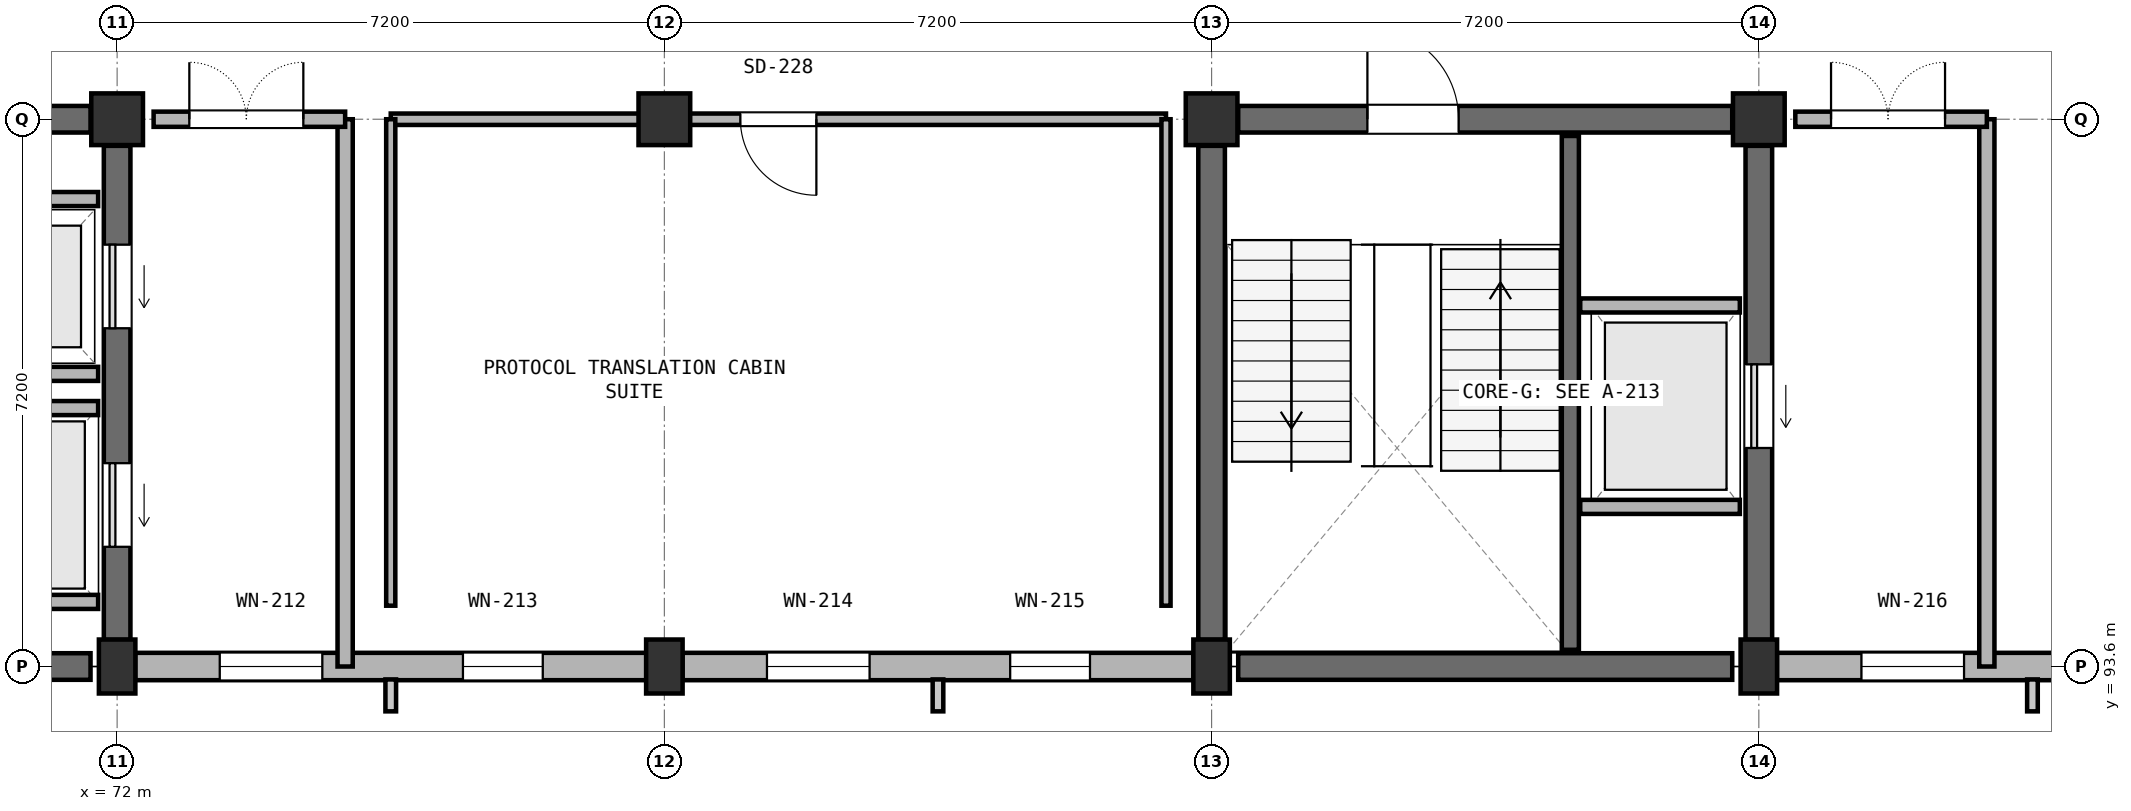
"""IFC4 building model, lengths in metres.
Left out: names, types, materials, properties, quantities, classifications, styles, units other than length and angle.
Written with IfcOpenShell. Run it as: python <this file> out.ifc"""

import sys

from ifc_helpers import new_model, si_unit, direction, frame, frame_2d, origin, origin_2d, place, context, subcontext, project, spatial, rectangle, extrude, element, fill, save


model = new_model("IFC4")
c1 = context("Model", 3, precision=1e-05, world=origin(), true_north=direction((0.0, 1.0)))
c2 = subcontext(c1, "Body", "Model", "MODEL_VIEW")
j1 = project(units=[si_unit("LENGTHUNIT", "METRE"), si_unit("PLANEANGLEUNIT", "RADIAN")], contexts=[c1])
p1 = place(None, origin())
s1 = spatial("IfcSite", under=j1, at=p1, CompositionType="ELEMENT")
p2 = place(p1, origin())
s2 = spatial("IfcBuilding", under=s1, at=p2, CompositionType="ELEMENT")
p3 = place(p2, frame((0.0, 0.0, 26.4)))
s3 = spatial("IfcBuildingStorey", under=s2, at=p3, CompositionType="ELEMENT", Elevation=26.4)
p4 = place(p3, frame((72.0, 93.6, 0.0), z_axis=(0.0, 0.0, 1.0), x_axis=(1.0, 0.0, 0.0)))
e1 = element("IfcColumn", 1, at=p4, inside=s3, PredefinedType="COLUMN", context=c2, shape_type="SweptSolid", body=[
    extrude(rectangle(XDim=0.48, YDim=0.71, at=origin_2d()), origin(), (0.0, 0.0, 1.0), 3.9),
])
p5 = place(p3, frame((72.0, 100.8, 0.0), z_axis=(0.0, 0.0, 1.0), x_axis=(1.0, 0.0, 0.0)))
e2 = element("IfcColumn", 2, at=p5, inside=s3, PredefinedType="COLUMN", context=c2, shape_type="SweptSolid", body=[
    extrude(rectangle(XDim=0.68, YDim=0.68, at=origin_2d()), origin(), (0.0, 0.0, 1.0), 3.9),
])
p6 = place(p3, frame((79.2, 93.6, 0.0), z_axis=(0.0, 0.0, 1.0), x_axis=(1.0, 0.0, 0.0)))
e3 = element("IfcColumn", 3, at=p6, inside=s3, PredefinedType="COLUMN", context=c2, shape_type="SweptSolid", body=[
    extrude(rectangle(XDim=0.48, YDim=0.71, at=origin_2d()), origin(), (0.0, 0.0, 1.0), 3.9),
])
p7 = place(p3, frame((79.2, 100.8, 0.0), z_axis=(0.0, 0.0, 1.0), x_axis=(1.0, 0.0, 0.0)))
e4 = element("IfcColumn", 4, at=p7, inside=s3, PredefinedType="COLUMN", context=c2, shape_type="SweptSolid", body=[
    extrude(rectangle(XDim=0.68, YDim=0.68, at=origin_2d()), origin(), (0.0, 0.0, 1.0), 3.9),
])
p8 = place(p3, frame((86.4, 93.6, 0.0), z_axis=(0.0, 0.0, 1.0), x_axis=(1.0, 0.0, 0.0)))
e5 = element("IfcColumn", 5, at=p8, inside=s3, PredefinedType="COLUMN", context=c2, shape_type="SweptSolid", body=[
    extrude(rectangle(XDim=0.48, YDim=0.71, at=origin_2d()), origin(), (0.0, 0.0, 1.0), 3.9),
])
p9 = place(p3, frame((86.4, 100.8, 0.0), z_axis=(0.0, 0.0, 1.0), x_axis=(1.0, 0.0, 0.0)))
e6 = element("IfcColumn", 6, at=p9, inside=s3, PredefinedType="COLUMN", context=c2, shape_type="SweptSolid", body=[
    extrude(rectangle(XDim=0.68, YDim=0.68, at=origin_2d()), origin(), (0.0, 0.0, 1.0), 3.9),
])
p10 = place(p3, frame((93.6, 93.6, 0.0), z_axis=(0.0, 0.0, 1.0), x_axis=(1.0, 0.0, 0.0)))
e7 = element("IfcColumn", 7, at=p10, inside=s3, PredefinedType="COLUMN", context=c2, shape_type="SweptSolid", body=[
    extrude(rectangle(XDim=0.48, YDim=0.71, at=origin_2d()), origin(), (0.0, 0.0, 1.0), 3.9),
])
p11 = place(p3, frame((93.6, 100.8, 0.0), z_axis=(0.0, 0.0, 1.0), x_axis=(1.0, 0.0, 0.0)))
e8 = element("IfcColumn", 8, at=p11, inside=s3, PredefinedType="COLUMN", context=c2, shape_type="SweptSolid", body=[
    extrude(rectangle(XDim=0.68, YDim=0.68, at=origin_2d()), origin(), (0.0, 0.0, 1.0), 3.9),
])
p12 = place(p3, frame((65.15, 93.6, 0.0), z_axis=(0.0, 0.0, 1.0), x_axis=(1.0, 0.0, 0.0)))
e9 = element("IfcWall", 9, at=p12, inside=s3, PredefinedType="SHEAR", context=c2, shape_type="SweptSolid", body=[
    extrude(rectangle(XDim=6.5, YDim=0.35, at=frame_2d((3.25, 0.0))), origin(), (0.0, 0.0, 1.0), 3.9),
])
p13 = place(p3, frame((72.0, 93.95, 0.0), z_axis=(0.0, 0.0, 1.0), x_axis=(0.0, 1.0, 0.0)))
e10 = element("IfcWall", 10, at=p13, inside=s3, PredefinedType="SHEAR", context=c2, shape_type="SweptSolid", body=[
    extrude(rectangle(XDim=6.5, YDim=0.35, at=frame_2d((3.25, 0.0))), origin(), (0.0, 0.0, 1.0), 3.9),
])
p14 = place(p13, frame((1.225, 0.0, 0.0)))
e11 = element("IfcOpeningElement", 11, at=p14, cuts=e10, PredefinedType="OPENING", context=c2, shape_type="SweptSolid", body=[
    extrude(rectangle(XDim=1.1, YDim=2.2, at=frame_2d((0.55, 1.1))), frame((0.0, 0.185, 0.0), z_axis=(0.0, -1.0, 0.0), x_axis=(1.0, 0.0, 0.0)), (0.0, 0.0, 1.0), 0.37),
])
p15 = place(p13, frame((4.1, 0.0, 0.0)))
e12 = element("IfcOpeningElement", 12, at=p15, cuts=e10, PredefinedType="OPENING", context=c2, shape_type="SweptSolid", body=[
    extrude(rectangle(XDim=1.1, YDim=2.2, at=frame_2d((0.55, 1.1))), frame((0.0, 0.185, 0.0), z_axis=(0.0, -1.0, 0.0), x_axis=(1.0, 0.0, 0.0)), (0.0, 0.0, 1.0), 0.37),
])
p16 = place(p3, frame((71.65, 100.8, 0.0), z_axis=(0.0, 0.0, 1.0), x_axis=(-1.0, 0.0, 0.0)))
e13 = element("IfcWall", 13, at=p16, inside=s3, PredefinedType="SHEAR", context=c2, shape_type="SweptSolid", body=[
    extrude(rectangle(XDim=6.5, YDim=0.35, at=frame_2d((3.25, 0.0))), origin(), (0.0, 0.0, 1.0), 3.9),
])
p17 = place(p16, frame((3.6, 0.0, 0.0)))
e14 = element("IfcOpeningElement", 14, at=p17, cuts=e13, PredefinedType="OPENING", context=c2, shape_type="SweptSolid", body=[
    extrude(rectangle(XDim=1.2, YDim=2.2, at=frame_2d((0.6, 1.1))), frame((0.0, 0.185, 0.0), z_axis=(0.0, -1.0, 0.0), x_axis=(1.0, 0.0, 0.0)), (0.0, 0.0, 1.0), 0.37),
])
p18 = place(p3, frame((86.75, 93.6, 0.0), z_axis=(0.0, 0.0, 1.0), x_axis=(1.0, 0.0, 0.0)))
e15 = element("IfcWall", 15, at=p18, inside=s3, PredefinedType="SHEAR", context=c2, shape_type="SweptSolid", body=[
    extrude(rectangle(XDim=6.5, YDim=0.35, at=frame_2d((3.25, 0.0))), origin(), (0.0, 0.0, 1.0), 3.9),
])
p19 = place(p3, frame((93.6, 93.95, 0.0), z_axis=(0.0, 0.0, 1.0), x_axis=(0.0, 1.0, 0.0)))
e16 = element("IfcWall", 16, at=p19, inside=s3, PredefinedType="SHEAR", context=c2, shape_type="SweptSolid", body=[
    extrude(rectangle(XDim=6.5, YDim=0.35, at=frame_2d((3.25, 0.0))), origin(), (0.0, 0.0, 1.0), 3.9),
])
p20 = place(p19, frame((2.525, 0.0, 0.0)))
e17 = element("IfcOpeningElement", 17, at=p20, cuts=e16, PredefinedType="OPENING", context=c2, shape_type="SweptSolid", body=[
    extrude(rectangle(XDim=1.1, YDim=2.2, at=frame_2d((0.55, 1.1))), frame((0.0, 0.185, 0.0), z_axis=(0.0, -1.0, 0.0), x_axis=(1.0, 0.0, 0.0)), (0.0, 0.0, 1.0), 0.37),
])
p21 = place(p3, frame((93.25, 100.8, 0.0), z_axis=(0.0, 0.0, 1.0), x_axis=(-1.0, 0.0, 0.0)))
e18 = element("IfcWall", 18, at=p21, inside=s3, PredefinedType="SHEAR", context=c2, shape_type="SweptSolid", body=[
    extrude(rectangle(XDim=6.5, YDim=0.35, at=frame_2d((3.25, 0.0))), origin(), (0.0, 0.0, 1.0), 3.9),
])
p22 = place(p21, frame((3.6, 0.0, 0.0)))
e19 = element("IfcOpeningElement", 19, at=p22, cuts=e18, PredefinedType="OPENING", context=c2, shape_type="SweptSolid", body=[
    extrude(rectangle(XDim=1.2, YDim=2.2, at=frame_2d((0.6, 1.1))), frame((0.0, 0.185, 0.0), z_axis=(0.0, -1.0, 0.0), x_axis=(1.0, 0.0, 0.0)), (0.0, 0.0, 1.0), 0.37),
])
p23 = place(p3, frame((86.4, 100.45, 0.0), z_axis=(0.0, 0.0, 1.0), x_axis=(0.0, -1.0, 0.0)))
e20 = element("IfcWall", 20, at=p23, inside=s3, PredefinedType="SHEAR", context=c2, shape_type="SweptSolid", body=[
    extrude(rectangle(XDim=6.5, YDim=0.35, at=frame_2d((3.25, 0.0))), origin(), (0.0, 0.0, 1.0), 3.9),
])
p24 = place(p3, frame((91.12, 93.82, 0.0), z_axis=(0.0, 0.0, 1.0), x_axis=(0.0, 1.0, 0.0)))
e21 = element("IfcWall", 21, at=p24, inside=s3, PredefinedType="SHEAR", context=c2, shape_type="SweptSolid", body=[
    extrude(rectangle(XDim=6.76, YDim=0.225, at=frame_2d((3.38, 0.0))), origin(), (0.0, 0.0, 1.0), 3.9),
])
for number, where, z_axis, x_axis in (
    (22, (69.65, 94.45, 0.0), (0.0, 0.0, 1.0), (1.0, 0.0, 0.0)),
    (23, (69.65, 97.0, 0.0), (0.0, 0.0, 1.0), (1.0, 0.0, 0.0)),
    (24, (69.65, 97.45, 0.0), (0.0, 0.0, 1.0), (1.0, 0.0, 0.0)),
    (25, (69.65, 99.75, 0.0), (0.0, 0.0, 1.0), (1.0, 0.0, 0.0)),
    (26, (91.25, 95.7, 0.0), (0.0, 0.0, 1.0), (1.0, 0.0, 0.0)),
    (27, (91.25, 98.35, 0.0), (0.0, 0.0, 1.0), (1.0, 0.0, 0.0)),
):
    element("IfcWall", number, at=place(p3, frame(where, z_axis=z_axis, x_axis=x_axis)), inside=s3, PredefinedType="PARTITIONING", context=c2, shape_type="SweptSolid", body=[
        extrude(rectangle(XDim=2.1, YDim=0.185, at=frame_2d((1.05, 0.0))), origin(), (0.0, 0.0, 1.0), 3.9),
    ])
p25 = place(p3, frame((72.238, 93.6, 0.0), z_axis=(0.0, 0.0, 1.0), x_axis=(1.0, 0.0, 0.0)))
e28 = element("IfcWall", 28, at=p25, inside=s3, PredefinedType="SOLIDWALL", context=c2, shape_type="SweptSolid", body=[
    extrude(rectangle(XDim=6.724, YDim=0.36, at=frame_2d((3.362, 0.0))), origin(), (0.0, 0.0, 1.0), 2.74),
])
p26 = place(p25, frame((1.112, 0.0, 0.7)))
e29 = element("IfcOpeningElement", 29, at=p26, cuts=e28, PredefinedType="OPENING", context=c2, shape_type="SweptSolid", body=[
    extrude(rectangle(XDim=1.35, YDim=1.89, at=frame_2d((0.675, 0.945))), frame((0.0, 0.19, 0.0), z_axis=(0.0, -1.0, 0.0), x_axis=(1.0, 0.0, 0.0)), (0.0, 0.0, 1.0), 0.38),
])
p27 = place(p25, frame((4.312, 0.0, 0.7)))
e30 = element("IfcOpeningElement", 30, at=p27, cuts=e28, PredefinedType="OPENING", context=c2, shape_type="SweptSolid", body=[
    extrude(rectangle(XDim=1.05, YDim=1.89, at=frame_2d((0.525, 0.945))), frame((0.0, 0.19, 0.0), z_axis=(0.0, -1.0, 0.0), x_axis=(1.0, 0.0, 0.0)), (0.0, 0.0, 1.0), 0.38),
])
p28 = place(p3, frame((79.438, 93.6, 0.0), z_axis=(0.0, 0.0, 1.0), x_axis=(1.0, 0.0, 0.0)))
e31 = element("IfcWall", 31, at=p28, inside=s3, PredefinedType="SOLIDWALL", context=c2, shape_type="SweptSolid", body=[
    extrude(rectangle(XDim=6.724, YDim=0.36, at=frame_2d((3.362, 0.0))), origin(), (0.0, 0.0, 1.0), 2.74),
])
p29 = place(p28, frame((1.112, 0.0, 0.7)))
e32 = element("IfcOpeningElement", 32, at=p29, cuts=e31, PredefinedType="OPENING", context=c2, shape_type="SweptSolid", body=[
    extrude(rectangle(XDim=1.35, YDim=1.89, at=frame_2d((0.675, 0.945))), frame((0.0, 0.19, 0.0), z_axis=(0.0, -1.0, 0.0), x_axis=(1.0, 0.0, 0.0)), (0.0, 0.0, 1.0), 0.38),
])
p30 = place(p28, frame((4.312, 0.0, 0.7)))
e33 = element("IfcOpeningElement", 33, at=p30, cuts=e31, PredefinedType="OPENING", context=c2, shape_type="SweptSolid", body=[
    extrude(rectangle(XDim=1.05, YDim=1.89, at=frame_2d((0.525, 0.945))), frame((0.0, 0.19, 0.0), z_axis=(0.0, -1.0, 0.0), x_axis=(1.0, 0.0, 0.0)), (0.0, 0.0, 1.0), 0.38),
])
p31 = place(p3, frame((93.838, 93.6, 0.0), z_axis=(0.0, 0.0, 1.0), x_axis=(1.0, 0.0, 0.0)))
e34 = element("IfcWall", 34, at=p31, inside=s3, PredefinedType="SOLIDWALL", context=c2, shape_type="SweptSolid", body=[
    extrude(rectangle(XDim=6.724, YDim=0.36, at=frame_2d((3.362, 0.0))), origin(), (0.0, 0.0, 1.0), 2.74),
])
p32 = place(p31, frame((1.112, 0.0, 0.7)))
e35 = element("IfcOpeningElement", 35, at=p32, cuts=e34, PredefinedType="OPENING", context=c2, shape_type="SweptSolid", body=[
    extrude(rectangle(XDim=1.35, YDim=1.89, at=frame_2d((0.675, 0.945))), frame((0.0, 0.19, 0.0), z_axis=(0.0, -1.0, 0.0), x_axis=(1.0, 0.0, 0.0)), (0.0, 0.0, 1.0), 0.38),
])
p33 = place(p31, frame((4.312, 0.0, 0.7)))
e36 = element("IfcOpeningElement", 36, at=p33, cuts=e34, PredefinedType="OPENING", context=c2, shape_type="SweptSolid", body=[
    extrude(rectangle(XDim=1.05, YDim=1.89, at=frame_2d((0.525, 0.945))), frame((0.0, 0.19, 0.0), z_axis=(0.0, -1.0, 0.0), x_axis=(1.0, 0.0, 0.0)), (0.0, 0.0, 1.0), 0.38),
])
p34 = place(p3, frame((75.0, 93.6, 0.0), z_axis=(0.0, 0.0, 1.0), x_axis=(0.0, 1.0, 0.0)))
e37 = element("IfcWall", 37, at=p34, inside=s3, PredefinedType="PARTITIONING", context=c2, shape_type="SweptSolid", body=[
    extrude(rectangle(XDim=7.2, YDim=0.2, at=frame_2d((3.6, 0.0))), origin(), (0.0, 0.0, 1.0), 2.78),
])
p35 = place(p3, frame((75.0, 100.8, 0.0), z_axis=(0.0, 0.0, 1.0), x_axis=(-1.0, 0.0, 0.0)))
e38 = element("IfcWall", 38, at=p35, inside=s3, PredefinedType="PARTITIONING", context=c2, shape_type="SweptSolid", body=[
    extrude(rectangle(XDim=2.52, YDim=0.2, at=frame_2d((1.26, 0.0))), origin(), (0.0, 0.0, 1.0), 2.78),
])
p36 = place(p35, frame((0.55, 0.0, 0.0)))
e39 = element("IfcOpeningElement", 39, at=p36, cuts=e38, PredefinedType="OPENING", context=c2, shape_type="SweptSolid", body=[
    extrude(rectangle(XDim=1.5, YDim=2.2, at=frame_2d((0.75, 1.1))), frame((0.0, 0.11, 0.0), z_axis=(0.0, -1.0, 0.0), x_axis=(1.0, 0.0, 0.0)), (0.0, 0.0, 1.0), 0.22),
])
p37 = place(p3, frame((96.6, 93.6, 0.0), z_axis=(0.0, 0.0, 1.0), x_axis=(0.0, 1.0, 0.0)))
e40 = element("IfcWall", 40, at=p37, inside=s3, PredefinedType="PARTITIONING", context=c2, shape_type="SweptSolid", body=[
    extrude(rectangle(XDim=7.2, YDim=0.2, at=frame_2d((3.6, 0.0))), origin(), (0.0, 0.0, 1.0), 2.78),
])
p38 = place(p3, frame((96.6, 100.8, 0.0), z_axis=(0.0, 0.0, 1.0), x_axis=(-1.0, 0.0, 0.0)))
e41 = element("IfcWall", 41, at=p38, inside=s3, PredefinedType="PARTITIONING", context=c2, shape_type="SweptSolid", body=[
    extrude(rectangle(XDim=2.52, YDim=0.2, at=frame_2d((1.26, 0.0))), origin(), (0.0, 0.0, 1.0), 2.78),
])
p39 = place(p38, frame((0.55, 0.0, 0.0)))
e42 = element("IfcOpeningElement", 42, at=p39, cuts=e41, PredefinedType="OPENING", context=c2, shape_type="SweptSolid", body=[
    extrude(rectangle(XDim=1.5, YDim=2.2, at=frame_2d((0.75, 1.1))), frame((0.0, 0.11, 0.0), z_axis=(0.0, -1.0, 0.0), x_axis=(1.0, 0.0, 0.0)), (0.0, 0.0, 1.0), 0.22),
])
p40 = place(p3, frame((85.8, 100.8, 0.0), z_axis=(0.0, 0.0, 1.0), x_axis=(-1.0, 0.0, 0.0)))
e43 = element("IfcWall", 43, at=p40, inside=s3, PredefinedType="PARTITIONING", context=c2, shape_type="SweptSolid", body=[
    extrude(rectangle(XDim=10.2, YDim=0.15, at=frame_2d((5.1, 0.0))), origin(), (0.0, 0.0, 1.0), 2.78),
])
p41 = place(p40, frame((4.6, 0.0, 0.0)))
e44 = element("IfcOpeningElement", 44, at=p41, cuts=e43, PredefinedType="OPENING", context=c2, shape_type="SweptSolid", body=[
    extrude(rectangle(XDim=1.0, YDim=2.15, at=frame_2d((0.5, 1.075))), frame((0.0, 0.085, 0.0), z_axis=(0.0, -1.0, 0.0), x_axis=(1.0, 0.0, 0.0)), (0.0, 0.0, 1.0), 0.17),
])
for number, where, z_axis, x_axis in (
    (45, (75.6, 94.4, 0.0), (0.0, 0.0, 1.0), (0.0, 1.0, 0.0)),
    (46, (85.8, 100.8, 0.0), (0.0, 0.0, 1.0), (0.0, -1.0, 0.0)),
):
    element("IfcWall", number, at=place(p3, frame(where, z_axis=z_axis, x_axis=x_axis)), inside=s3, PredefinedType="PARTITIONING", context=c2, shape_type="SweptSolid", body=[
        extrude(rectangle(XDim=6.4, YDim=0.12, at=frame_2d((3.2, 0.0))), origin(), (0.0, 0.0, 1.0), 2.78),
    ])
p42 = place(p14, origin())
e47 = element("IfcDoor", 47, at=p42, inside=s3, OperationType="SLIDING_TO_LEFT", PredefinedType="DOOR", context=c2, shape_type="SweptSolid", body=[
    extrude(rectangle(XDim=1.1, YDim=2.2, at=frame_2d((0.55, 1.1))), frame((0.0, 0.025, 0.0), z_axis=(0.0, -1.0, 0.0), x_axis=(1.0, 0.0, 0.0)), (0.0, 0.0, 1.0), 0.05),
])
fill(e11, e47)
p43 = place(p15, origin())
e48 = element("IfcDoor", 48, at=p43, inside=s3, OperationType="SLIDING_TO_LEFT", PredefinedType="DOOR", context=c2, shape_type="SweptSolid", body=[
    extrude(rectangle(XDim=1.1, YDim=2.2, at=frame_2d((0.55, 1.1))), frame((0.0, 0.025, 0.0), z_axis=(0.0, -1.0, 0.0), x_axis=(1.0, 0.0, 0.0)), (0.0, 0.0, 1.0), 0.05),
])
fill(e12, e48)
p44 = place(p20, origin())
e49 = element("IfcDoor", 49, at=p44, inside=s3, OperationType="SLIDING_TO_LEFT", PredefinedType="DOOR", context=c2, shape_type="SweptSolid", body=[
    extrude(rectangle(XDim=1.1, YDim=2.2, at=frame_2d((0.55, 1.1))), frame((0.0, 0.025, 0.0), z_axis=(0.0, -1.0, 0.0), x_axis=(1.0, 0.0, 0.0)), (0.0, 0.0, 1.0), 0.05),
])
fill(e17, e49)
p45 = place(p26, origin())
e50 = element("IfcWindow", 50, at=p45, inside=s3, PartitioningType="DOUBLE_PANEL_VERTICAL", PredefinedType="WINDOW", context=c2, shape_type="SweptSolid", body=[
    extrude(rectangle(XDim=1.35, YDim=1.89, at=frame_2d((0.675, 0.945))), frame((0.0, 0.03, 0.0), z_axis=(0.0, -1.0, 0.0), x_axis=(1.0, 0.0, 0.0)), (0.0, 0.0, 1.0), 0.06),
])
fill(e29, e50)
p46 = place(p27, origin())
e51 = element("IfcWindow", 51, at=p46, inside=s3, PartitioningType="SINGLE_PANEL", PredefinedType="WINDOW", context=c2, shape_type="SweptSolid", body=[
    extrude(rectangle(XDim=1.05, YDim=1.89, at=frame_2d((0.525, 0.945))), frame((0.0, 0.03, 0.0), z_axis=(0.0, -1.0, 0.0), x_axis=(1.0, 0.0, 0.0)), (0.0, 0.0, 1.0), 0.06),
])
fill(e30, e51)
p47 = place(p29, origin())
e52 = element("IfcWindow", 52, at=p47, inside=s3, PartitioningType="DOUBLE_PANEL_VERTICAL", PredefinedType="WINDOW", context=c2, shape_type="SweptSolid", body=[
    extrude(rectangle(XDim=1.35, YDim=1.89, at=frame_2d((0.675, 0.945))), frame((0.0, 0.03, 0.0), z_axis=(0.0, -1.0, 0.0), x_axis=(1.0, 0.0, 0.0)), (0.0, 0.0, 1.0), 0.06),
])
fill(e32, e52)
p48 = place(p30, origin())
e53 = element("IfcWindow", 53, at=p48, inside=s3, PartitioningType="SINGLE_PANEL", PredefinedType="WINDOW", context=c2, shape_type="SweptSolid", body=[
    extrude(rectangle(XDim=1.05, YDim=1.89, at=frame_2d((0.525, 0.945))), frame((0.0, 0.03, 0.0), z_axis=(0.0, -1.0, 0.0), x_axis=(1.0, 0.0, 0.0)), (0.0, 0.0, 1.0), 0.06),
])
fill(e33, e53)
p49 = place(p32, origin())
e54 = element("IfcWindow", 54, at=p49, inside=s3, PartitioningType="DOUBLE_PANEL_VERTICAL", PredefinedType="WINDOW", context=c2, shape_type="SweptSolid", body=[
    extrude(rectangle(XDim=1.35, YDim=1.89, at=frame_2d((0.675, 0.945))), frame((0.0, 0.03, 0.0), z_axis=(0.0, -1.0, 0.0), x_axis=(1.0, 0.0, 0.0)), (0.0, 0.0, 1.0), 0.06),
])
fill(e35, e54)
p50 = place(p36, frame((1.5, 0.0, 0.0), z_axis=(0.0, 0.0, 1.0), x_axis=(-1.0, 0.0, 0.0)))
e55 = element("IfcDoor", 55, at=p50, inside=s3, OperationType="DOUBLE_DOOR_SINGLE_SWING", PredefinedType="DOOR", context=c2, shape_type="SweptSolid", body=[
    extrude(rectangle(XDim=1.5, YDim=2.2, at=frame_2d((0.75, 1.1))), frame((0.0, 0.025, 0.0), z_axis=(0.0, -1.0, 0.0), x_axis=(1.0, 0.0, 0.0)), (0.0, 0.0, 1.0), 0.05),
])
fill(e39, e55)
p51 = place(p22, frame((1.2, 0.0, 0.0), z_axis=(0.0, 0.0, 1.0), x_axis=(-1.0, 0.0, 0.0)))
e56 = element("IfcDoor", 56, at=p51, inside=s3, OperationType="SINGLE_SWING_LEFT", PredefinedType="DOOR", context=c2, shape_type="SweptSolid", body=[
    extrude(rectangle(XDim=1.2, YDim=2.2, at=frame_2d((0.6, 1.1))), frame((0.0, 0.025, 0.0), z_axis=(0.0, -1.0, 0.0), x_axis=(1.0, 0.0, 0.0)), (0.0, 0.0, 1.0), 0.05),
])
fill(e19, e56)
p52 = place(p39, frame((1.5, 0.0, 0.0), z_axis=(0.0, 0.0, 1.0), x_axis=(-1.0, 0.0, 0.0)))
e57 = element("IfcDoor", 57, at=p52, inside=s3, OperationType="DOUBLE_DOOR_SINGLE_SWING", PredefinedType="DOOR", context=c2, shape_type="SweptSolid", body=[
    extrude(rectangle(XDim=1.5, YDim=2.2, at=frame_2d((0.75, 1.1))), frame((0.0, 0.025, 0.0), z_axis=(0.0, -1.0, 0.0), x_axis=(1.0, 0.0, 0.0)), (0.0, 0.0, 1.0), 0.05),
])
fill(e42, e57)
p53 = place(p41, origin())
e58 = element("IfcDoor", 58, at=p53, inside=s3, OperationType="SINGLE_SWING_LEFT", PredefinedType="DOOR", context=c2, shape_type="SweptSolid", body=[
    extrude(rectangle(XDim=1.0, YDim=2.15, at=frame_2d((0.5, 1.075))), frame((0.0, 0.025, 0.0), z_axis=(0.0, -1.0, 0.0), x_axis=(1.0, 0.0, 0.0)), (0.0, 0.0, 1.0), 0.05),
])
fill(e44, e58)
save(model, sys.argv[1])
